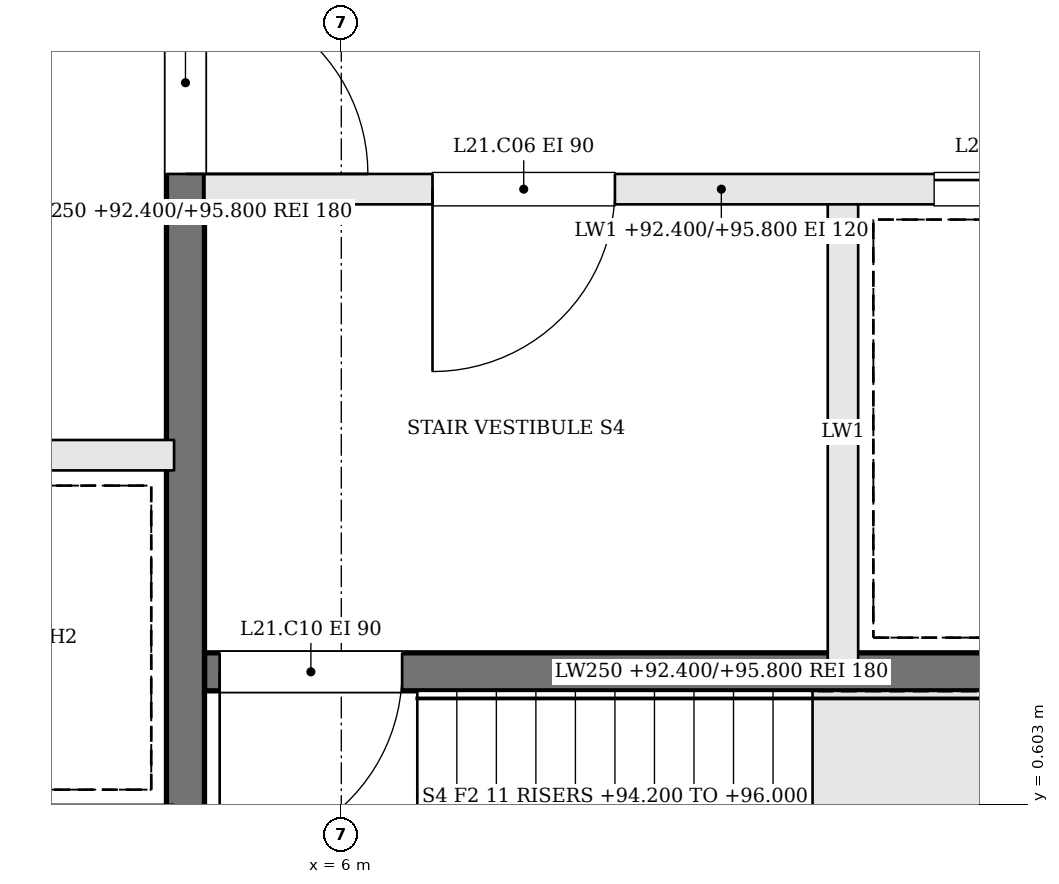
"""IFC4 building model, lengths in metres.
Left out: names, types, materials, properties, quantities, classifications, styles, units other than length and angle.
Written with IfcOpenShell. Run it as: python <this file> out.ifc"""

import sys

from ifc_helpers import new_model, si_unit, direction, frame, frame_2d, origin, place, context, subcontext, project, spatial, rectangle, extrude, element, fill, save


model = new_model("IFC4")
c1 = context("Model", 3, precision=1e-05, world=origin(), true_north=direction((0.0, 1.0)))
c2 = subcontext(c1, "Body", "Model", "MODEL_VIEW")
j1 = project(units=[si_unit("LENGTHUNIT", "METRE"), si_unit("PLANEANGLEUNIT", "RADIAN")], contexts=[c1])
p1 = place(None, origin())
s1 = spatial("IfcSite", under=j1, at=p1, CompositionType="ELEMENT")
p2 = place(p1, origin())
s2 = spatial("IfcBuilding", under=s1, at=p2, CompositionType="ELEMENT")
p3 = place(p2, frame((0.0, 0.0, 92.4)))
s3 = spatial("IfcBuildingStorey", under=s2, at=p3, CompositionType="ELEMENT", Elevation=92.4)
p4 = place(p3, frame((11.9, 4.65, 0.0), z_axis=(0.0, 0.0, 1.0), x_axis=(-1.0, 0.0, 0.0)))
e1 = element("IfcWall", 1, at=p4, inside=s3, PredefinedType="SOLIDWALL", context=c2, shape_type="SweptSolid", body=[
    extrude(rectangle(XDim=6.8, YDim=0.2, at=frame_2d((3.4, 0.0))), origin(), (0.0, 0.0, 1.0), 3.4),
])
p5 = place(p4, frame((4.1, 0.0, 0.0)))
e2 = element("IfcOpeningElement", 2, at=p5, cuts=e1, PredefinedType="OPENING", context=c2, shape_type="SweptSolid", body=[
    extrude(rectangle(XDim=1.2, YDim=2.1, at=frame_2d((0.6, 1.05))), frame((0.0, 0.11, 0.0), z_axis=(0.0, -1.0, 0.0), x_axis=(1.0, 0.0, 0.0)), (0.0, 0.0, 1.0), 0.22),
])
p6 = place(p4, frame((0.8, 0.0, 0.0)))
e3 = element("IfcOpeningElement", 3, at=p6, cuts=e1, PredefinedType="OPENING", context=c2, shape_type="SweptSolid", body=[
    extrude(rectangle(XDim=1.2, YDim=2.1, at=frame_2d((0.6, 1.05))), frame((0.0, 0.11, 0.0), z_axis=(0.0, -1.0, 0.0), x_axis=(1.0, 0.0, 0.0)), (0.0, 0.0, 1.0), 0.22),
])
p7 = place(p3, frame((11.9, 1.475, 0.0), z_axis=(0.0, 0.0, 1.0), x_axis=(-1.0, 0.0, 0.0)))
e4 = element("IfcWall", 4, at=p7, inside=s3, PredefinedType="SOLIDWALL", context=c2, shape_type="SweptSolid", body=[
    extrude(rectangle(XDim=6.8, YDim=0.25, at=frame_2d((3.4, 0.0))), origin(), (0.0, 0.0, 1.0), 3.4),
])
p8 = place(p7, frame((5.5, 0.0, 0.0)))
e5 = element("IfcOpeningElement", 5, at=p8, cuts=e4, PredefinedType="OPENING", context=c2, shape_type="SweptSolid", body=[
    extrude(rectangle(XDim=1.2, YDim=2.1, at=frame_2d((0.6, 1.05))), frame((0.0, 0.135, 0.0), z_axis=(0.0, -1.0, 0.0), x_axis=(1.0, 0.0, 0.0)), (0.0, 0.0, 1.0), 0.27),
])
p9 = place(p3, frame((9.3, 4.55, 0.0), z_axis=(0.0, 0.0, 1.0), x_axis=(0.0, -1.0, 0.0)))
e6 = element("IfcWall", 6, at=p9, inside=s3, PredefinedType="SOLIDWALL", context=c2, shape_type="SweptSolid", body=[
    extrude(rectangle(XDim=3.0, YDim=0.2, at=frame_2d((1.5, 0.0))), origin(), (0.0, 0.0, 1.0), 3.4),
])
p10 = place(p3, frame((4.975, 10.9, 0.0), z_axis=(0.0, 0.0, 1.0), x_axis=(0.0, -1.0, 0.0)))
e7 = element("IfcWall", 7, at=p10, inside=s3, PredefinedType="SOLIDWALL", context=c2, shape_type="SweptSolid", body=[
    extrude(rectangle(XDim=12.8, YDim=0.25, at=frame_2d((6.4, 0.0))), origin(), (0.0, 0.0, 1.0), 3.4),
])
p11 = place(p10, frame((4.95, 0.0, 0.0)))
e8 = element("IfcOpeningElement", 8, at=p11, cuts=e7, PredefinedType="OPENING", context=c2, shape_type="SweptSolid", body=[
    extrude(rectangle(XDim=1.2, YDim=2.1, at=frame_2d((0.6, 1.05))), frame((0.0, 0.135, 0.0), z_axis=(0.0, -1.0, 0.0), x_axis=(1.0, 0.0, 0.0)), (0.0, 0.0, 1.0), 0.27),
])
p12 = place(p3, frame((-4.9, 2.9, 0.0), z_axis=(0.0, 0.0, 1.0), x_axis=(1.0, 0.0, 0.0)))
e9 = element("IfcWall", 9, at=p12, inside=s3, PredefinedType="SOLIDWALL", context=c2, shape_type="SweptSolid", body=[
    extrude(rectangle(XDim=9.8, YDim=0.2, at=frame_2d((4.9, 0.0))), origin(), (0.0, 0.0, 1.0), 3.4),
])
p13 = place(p12, frame((0.675, 0.0, 0.0)))
e10 = element("IfcOpeningElement", 10, at=p13, cuts=e9, PredefinedType="OPENING", context=c2, shape_type="SweptSolid", body=[
    extrude(rectangle(XDim=1.1, YDim=2.1, at=frame_2d((0.55, 1.05))), frame((0.0, 0.11, 0.0), z_axis=(0.0, -1.0, 0.0), x_axis=(1.0, 0.0, 0.0)), (0.0, 0.0, 1.0), 0.22),
])
p14 = place(p12, frame((3.125, 0.0, 0.0)))
e11 = element("IfcOpeningElement", 11, at=p14, cuts=e9, PredefinedType="OPENING", context=c2, shape_type="SweptSolid", body=[
    extrude(rectangle(XDim=1.1, YDim=2.1, at=frame_2d((0.55, 1.05))), frame((0.0, 0.11, 0.0), z_axis=(0.0, -1.0, 0.0), x_axis=(1.0, 0.0, 0.0)), (0.0, 0.0, 1.0), 0.22),
])
p15 = place(p11, origin())
e12 = element("IfcDoor", 12, at=p15, inside=s3, OperationType="SINGLE_SWING_RIGHT", PredefinedType="DOOR", context=c2, shape_type="SweptSolid", body=[
    extrude(rectangle(XDim=1.2, YDim=2.1, at=frame_2d((0.6, 1.05))), frame((0.0, 0.025, 0.0), z_axis=(0.0, -1.0, 0.0), x_axis=(1.0, 0.0, 0.0)), (0.0, 0.0, 1.0), 0.05),
])
fill(e8, e12)
p16 = place(p5, origin())
e13 = element("IfcDoor", 13, at=p16, inside=s3, OperationType="SINGLE_SWING_RIGHT", PredefinedType="DOOR", context=c2, shape_type="SweptSolid", body=[
    extrude(rectangle(XDim=1.2, YDim=2.1, at=frame_2d((0.6, 1.05))), frame((0.0, 0.025, 0.0), z_axis=(0.0, -1.0, 0.0), x_axis=(1.0, 0.0, 0.0)), (0.0, 0.0, 1.0), 0.05),
])
fill(e2, e13)
p17 = place(p8, origin())
e14 = element("IfcDoor", 14, at=p17, inside=s3, OperationType="SINGLE_SWING_RIGHT", PredefinedType="DOOR", context=c2, shape_type="SweptSolid", body=[
    extrude(rectangle(XDim=1.2, YDim=2.1, at=frame_2d((0.6, 1.05))), frame((0.0, 0.025, 0.0), z_axis=(0.0, -1.0, 0.0), x_axis=(1.0, 0.0, 0.0)), (0.0, 0.0, 1.0), 0.05),
])
fill(e5, e14)
p18 = place(p6, origin())
e15 = element("IfcDoor", 15, at=p18, inside=s3, OperationType="SLIDING_TO_RIGHT", PredefinedType="DOOR", context=c2, shape_type="SweptSolid", body=[
    extrude(rectangle(XDim=1.2, YDim=2.1, at=frame_2d((0.6, 1.05))), frame((0.0, 0.025, 0.0), z_axis=(0.0, -1.0, 0.0), x_axis=(1.0, 0.0, 0.0)), (0.0, 0.0, 1.0), 0.05),
])
fill(e3, e15)
save(model, sys.argv[1])
